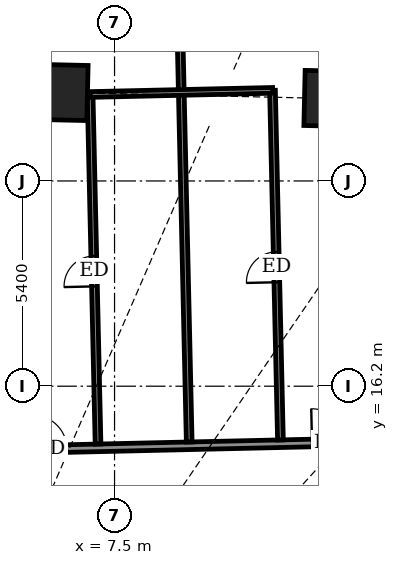
"""IFC4 building model, lengths in metres.
Left out: names, types, materials, properties, quantities, classifications, styles, units other than length and angle.
Written with IfcOpenShell. Run it as: python <this file> out.ifc"""

import sys

from ifc_helpers import new_model, si_unit, direction, frame, frame_2d, origin, origin_2d, place, context, subcontext, project, spatial, rectangle, extrude, element, fill, save


model = new_model("IFC4")
c1 = context("Model", 3, precision=1e-05, world=origin(), true_north=direction((0.0, 1.0)))
c2 = subcontext(c1, "Body", "Model", "MODEL_VIEW")
j1 = project(units=[si_unit("LENGTHUNIT", "METRE"), si_unit("PLANEANGLEUNIT", "RADIAN")], contexts=[c1])
p1 = place(None, origin())
s1 = spatial("IfcSite", under=j1, at=p1, CompositionType="ELEMENT")
p2 = place(p1, origin())
s2 = spatial("IfcBuilding", under=s1, at=p2, CompositionType="ELEMENT")
p3 = place(p2, frame((0.0, 0.0, 74.7)))
s3 = spatial("IfcBuildingStorey", under=s2, at=p3, CompositionType="ELEMENT", Elevation=74.7)
for number, where, z_axis, x_axis in (
    (1, (13.224, 23.768, -0.55), (0.0, 0.0, 1.0), (-1.0, 0.023, 0.0)),
    (2, (6.062, 23.93, -0.55), (0.0, 0.0, 1.0), (-1.0, 0.023, 0.0)),
):
    element("IfcColumn", number, at=place(p3, frame(where, z_axis=z_axis, x_axis=x_axis)), inside=s3, PredefinedType="COLUMN", context=c2, shape_type="SweptSolid", body=[
        extrude(rectangle(XDim=1.45, YDim=1.45, at=origin_2d()), origin(), (0.0, 0.0, 1.0), 4.6),
    ])
p4 = place(p3, frame((-25.525, 13.838, 0.0), z_axis=(0.0, 0.0, 1.0), x_axis=(0.999742549888, 0.022689952476, 0.0)))
e3 = element("IfcWall", 3, at=p4, inside=s3, PredefinedType="PARTITIONING", context=c2, shape_type="SweptSolid", body=[
    extrude(rectangle(XDim=53.778, YDim=0.2, at=frame_2d((26.889, 0.0))), origin(), (0.0, 0.0, 1.0), 2.25),
])
p5 = place(p4, frame((49.114, 0.0, 0.0)))
e4 = element("IfcOpeningElement", 4, at=p5, cuts=e3, PredefinedType="OPENING", context=c2, shape_type="SweptSolid", body=[
    extrude(rectangle(XDim=1.0, YDim=2.1, at=frame_2d((0.5, 1.05))), frame((0.0, 0.11, 0.0), z_axis=(0.0, -1.0, 0.0), x_axis=(1.0, 0.0, 0.0)), (0.0, 0.0, 1.0), 0.22),
])
p6 = place(p4, frame((40.781, 0.0, 0.0)))
e5 = element("IfcOpeningElement", 5, at=p6, cuts=e3, PredefinedType="OPENING", context=c2, shape_type="SweptSolid", body=[
    extrude(rectangle(XDim=0.9, YDim=2.1, at=frame_2d((0.45, 1.05))), frame((0.0, 0.11, 0.0), z_axis=(0.0, -1.0, 0.0), x_axis=(1.0, 0.0, 0.0)), (0.0, 0.0, 1.0), 0.22),
])
p7 = place(p4, frame((38.231, 0.0, 0.0)))
e6 = element("IfcOpeningElement", 6, at=p7, cuts=e3, PredefinedType="OPENING", context=c2, shape_type="SweptSolid", body=[
    extrude(rectangle(XDim=0.9, YDim=2.1, at=frame_2d((0.45, 1.05))), frame((0.0, 0.11, 0.0), z_axis=(0.0, -1.0, 0.0), x_axis=(1.0, 0.0, 0.0)), (0.0, 0.0, 1.0), 0.22),
])
p8 = place(p4, frame((30.881, 0.0, 0.0)))
e7 = element("IfcOpeningElement", 7, at=p8, cuts=e3, PredefinedType="OPENING", context=c2, shape_type="SweptSolid", body=[
    extrude(rectangle(XDim=0.9, YDim=2.1, at=frame_2d((0.45, 1.05))), frame((0.0, 0.11, 0.0), z_axis=(0.0, -1.0, 0.0), x_axis=(1.0, 0.0, 0.0)), (0.0, 0.0, 1.0), 0.22),
])
p9 = place(p4, frame((28.331, 0.0, 0.0)))
e8 = element("IfcOpeningElement", 8, at=p9, cuts=e3, PredefinedType="OPENING", context=c2, shape_type="SweptSolid", body=[
    extrude(rectangle(XDim=0.9, YDim=2.1, at=frame_2d((0.45, 1.05))), frame((0.0, 0.11, 0.0), z_axis=(0.0, -1.0, 0.0), x_axis=(1.0, 0.0, 0.0)), (0.0, 0.0, 1.0), 0.22),
])
p10 = place(p4, frame((20.406, 0.0, 0.0)))
e9 = element("IfcOpeningElement", 9, at=p10, cuts=e3, PredefinedType="OPENING", context=c2, shape_type="SweptSolid", body=[
    extrude(rectangle(XDim=1.0, YDim=2.1, at=frame_2d((0.5, 1.05))), frame((0.0, 0.11, 0.0), z_axis=(0.0, -1.0, 0.0), x_axis=(1.0, 0.0, 0.0)), (0.0, 0.0, 1.0), 0.22),
])
p11 = place(p4, frame((23.456, 0.0, 0.0)))
e10 = element("IfcOpeningElement", 10, at=p11, cuts=e3, PredefinedType="OPENING", context=c2, shape_type="SweptSolid", body=[
    extrude(rectangle(XDim=0.9, YDim=2.1, at=frame_2d((0.45, 1.05))), frame((0.0, 0.11, 0.0), z_axis=(0.0, -1.0, 0.0), x_axis=(1.0, 0.0, 0.0)), (0.0, 0.0, 1.0), 0.22),
])
p12 = place(p4, frame((14.931, 0.0, 0.0)))
e11 = element("IfcOpeningElement", 11, at=p12, cuts=e3, PredefinedType="OPENING", context=c2, shape_type="SweptSolid", body=[
    extrude(rectangle(XDim=1.0, YDim=2.1, at=frame_2d((0.5, 1.05))), frame((0.0, 0.11, 0.0), z_axis=(0.0, -1.0, 0.0), x_axis=(1.0, 0.0, 0.0)), (0.0, 0.0, 1.0), 0.22),
])
p13 = place(p4, frame((3.331, 0.0, 0.0)))
e12 = element("IfcOpeningElement", 12, at=p13, cuts=e3, PredefinedType="OPENING", context=c2, shape_type="SweptSolid", body=[
    extrude(rectangle(XDim=1.0, YDim=2.1, at=frame_2d((0.5, 1.05))), frame((0.0, 0.11, 0.0), z_axis=(0.0, -1.0, 0.0), x_axis=(1.0, 0.0, 0.0)), (0.0, 0.0, 1.0), 0.22),
])
p14 = place(p4, frame((10.006, 0.0, 0.0)))
e13 = element("IfcOpeningElement", 13, at=p14, cuts=e3, PredefinedType="OPENING", context=c2, shape_type="SweptSolid", body=[
    extrude(rectangle(XDim=0.9, YDim=2.1, at=frame_2d((0.45, 1.05))), frame((0.0, 0.11, 0.0), z_axis=(0.0, -1.0, 0.0), x_axis=(1.0, 0.0, 0.0)), (0.0, 0.0, 1.0), 0.22),
])
p15 = place(p3, frame((7.066, 14.677, 0.0), z_axis=(0.0, 0.0, 1.0), x_axis=(-0.02271477479, 0.999741986218, 0.0)))
e14 = element("IfcWall", 14, at=p15, inside=s3, PredefinedType="PARTITIONING", context=c2, shape_type="SweptSolid", body=[
    extrude(rectangle(XDim=9.2, YDim=0.15, at=frame_2d((4.6, 0.0))), origin(), (0.0, 0.0, 1.0), 2.45),
])
p16 = place(p15, frame((4.15, 0.0, 0.0)))
e15 = element("IfcOpeningElement", 15, at=p16, cuts=e14, PredefinedType="OPENING", context=c2, shape_type="SweptSolid", body=[
    extrude(rectangle(XDim=0.8, YDim=2.1, at=frame_2d((0.4, 1.05))), frame((0.0, 0.085, 0.0), z_axis=(0.0, -1.0, 0.0), x_axis=(1.0, 0.0, 0.0)), (0.0, 0.0, 1.0), 0.17),
])
p17 = place(p3, frame((9.465, 14.732, 0.0), z_axis=(0.0, 0.0, 1.0), x_axis=(-0.022661475803, 0.999743195783, 0.0)))
e16 = element("IfcWall", 16, at=p17, inside=s3, PredefinedType="PARTITIONING", context=c2, shape_type="SweptSolid", body=[
    extrude(rectangle(XDim=12.4, YDim=0.15, at=frame_2d((6.2, 0.0))), origin(), (0.0, 0.0, 1.0), 2.45),
])
p18 = place(p3, frame((11.865, 14.786, 0.0), z_axis=(0.0, 0.0, 1.0), x_axis=(-0.02271477479, 0.999741986218, 0.0)))
e17 = element("IfcWall", 17, at=p18, inside=s3, PredefinedType="PARTITIONING", context=c2, shape_type="SweptSolid", body=[
    extrude(rectangle(XDim=9.2, YDim=0.15, at=frame_2d((4.6, 0.0))), origin(), (0.0, 0.0, 1.0), 2.45),
])
p19 = place(p18, frame((4.15, 0.0, 0.0)))
e18 = element("IfcOpeningElement", 18, at=p19, cuts=e17, PredefinedType="OPENING", context=c2, shape_type="SweptSolid", body=[
    extrude(rectangle(XDim=0.8, YDim=2.1, at=frame_2d((0.4, 1.05))), frame((0.0, 0.085, 0.0), z_axis=(0.0, -1.0, 0.0), x_axis=(1.0, 0.0, 0.0)), (0.0, 0.0, 1.0), 0.17),
])
p20 = place(p3, frame((6.861, 23.875, 0.0), z_axis=(0.0, 0.0, 1.0), x_axis=(0.999742675121, 0.022684433919, 0.0)))
e19 = element("IfcWall", 19, at=p20, inside=s3, PredefinedType="PARTITIONING", context=c2, shape_type="SweptSolid", body=[
    extrude(rectangle(XDim=4.8, YDim=0.15, at=frame_2d((2.4, 0.0))), origin(), (0.0, 0.0, 1.0), 2.45),
])
p21 = place(p7, origin())
e20 = element("IfcDoor", 20, at=p21, inside=s3, OperationType="SINGLE_SWING_LEFT", PredefinedType="DOOR", context=c2, shape_type="SweptSolid", body=[
    extrude(rectangle(XDim=0.9, YDim=2.1, at=frame_2d((0.45, 1.05))), frame((0.0, 0.025, 0.0), z_axis=(0.0, -1.0, 0.0), x_axis=(1.0, 0.0, 0.0)), (0.0, 0.0, 1.0), 0.05),
])
fill(e6, e20)
p22 = place(p19, origin())
e21 = element("IfcDoor", 21, at=p22, inside=s3, OperationType="SINGLE_SWING_LEFT", PredefinedType="DOOR", context=c2, shape_type="SweptSolid", body=[
    extrude(rectangle(XDim=0.8, YDim=2.1, at=frame_2d((0.4, 1.05))), frame((0.0, 0.025, 0.0), z_axis=(0.0, -1.0, 0.0), x_axis=(1.0, 0.0, 0.0)), (0.0, 0.0, 1.0), 0.05),
])
fill(e18, e21)
p23 = place(p8, origin())
e22 = element("IfcDoor", 22, at=p23, inside=s3, OperationType="SINGLE_SWING_RIGHT", PredefinedType="DOOR", context=c2, shape_type="SweptSolid", body=[
    extrude(rectangle(XDim=0.9, YDim=2.1, at=frame_2d((0.45, 1.05))), frame((0.0, 0.025, 0.0), z_axis=(0.0, -1.0, 0.0), x_axis=(1.0, 0.0, 0.0)), (0.0, 0.0, 1.0), 0.05),
])
fill(e7, e22)
p24 = place(p16, origin())
e23 = element("IfcDoor", 23, at=p24, inside=s3, OperationType="SINGLE_SWING_RIGHT", PredefinedType="DOOR", context=c2, shape_type="SweptSolid", body=[
    extrude(rectangle(XDim=0.8, YDim=2.1, at=frame_2d((0.4, 1.05))), frame((0.0, 0.025, 0.0), z_axis=(0.0, -1.0, 0.0), x_axis=(1.0, 0.0, 0.0)), (0.0, 0.0, 1.0), 0.05),
])
fill(e15, e23)
save(model, sys.argv[1])
